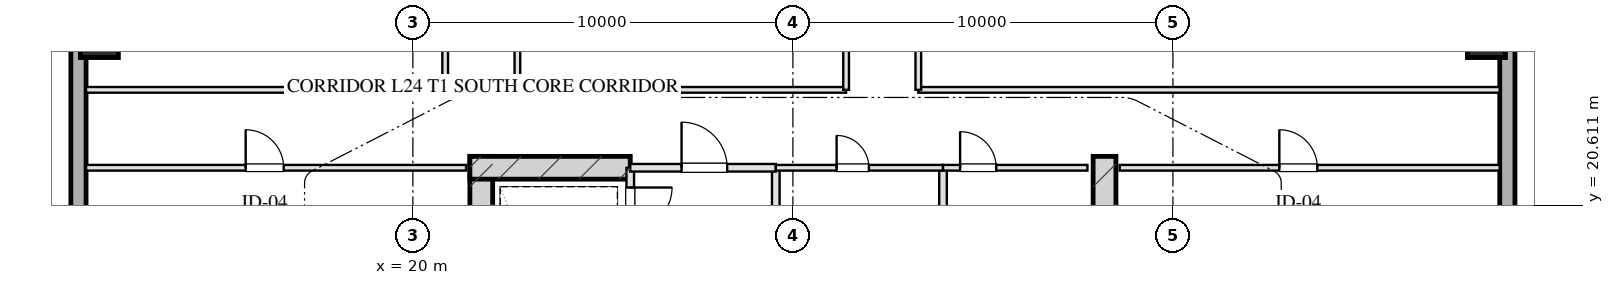
"""IFC4 building model, lengths in metres.
Left out: names, types, materials, properties, quantities, classifications, styles, units other than length and angle.
Written with IfcOpenShell. Run it as: python <this file> out.ifc"""

import sys

from ifc_helpers import new_model, si_unit, direction, frame, frame_2d, origin, origin_2d, place, context, subcontext, project, spatial, rectangle, hollow_rectangle, extrude, element, fill, save


model = new_model("IFC4")
c1 = context("Model", 3, precision=1e-05, world=origin(), true_north=direction((0.0, 1.0)))
c2 = subcontext(c1, "Body", "Model", "MODEL_VIEW")
j1 = project(units=[si_unit("LENGTHUNIT", "METRE"), si_unit("PLANEANGLEUNIT", "RADIAN")], contexts=[c1])
p1 = place(None, origin())
s1 = spatial("IfcSite", under=j1, at=p1, CompositionType="ELEMENT")
p2 = place(p1, origin())
s2 = spatial("IfcBuilding", under=s1, at=p2, CompositionType="ELEMENT")
p3 = place(p2, frame((0.0, 0.0, 96.6)))
s3 = spatial("IfcBuildingStorey", under=s2, at=p3, CompositionType="ELEMENT", Elevation=96.6)
for number, where, z_axis, x_axis in (
    (1, (21.8, 21.9, 0.0), (0.0, 0.0, 1.0), (0.0, -1.0, 0.0)),
    (2, (38.2, 21.9, 0.0), (0.0, 0.0, 1.0), (0.0, -1.0, 0.0)),
):
    element("IfcWall", number, at=place(p3, frame(where, z_axis=z_axis, x_axis=x_axis)), inside=s3, PredefinedType="SHEAR", context=c2, shape_type="SweptSolid", body=[
        extrude(rectangle(XDim=9.48, YDim=0.6, at=frame_2d((4.74, 0.0))), origin(), (0.0, 0.0, 1.0), 3.45),
    ])
p4 = place(p3, frame((21.5, 21.6, 0.0), z_axis=(0.0, 0.0, 1.0), x_axis=(1.0, 0.0, 0.0)))
e3 = element("IfcWall", 3, at=p4, inside=s3, PredefinedType="SHEAR", context=c2, shape_type="SweptSolid", body=[
    extrude(rectangle(XDim=4.22, YDim=0.6, at=frame_2d((2.11, 0.0))), origin(), (0.0, 0.0, 1.0), 3.45),
])
for number, where, z_axis, x_axis in (
    (4, (11.75, 25.0, 0.0), (0.0, 0.0, 1.0), (1.0, 0.0, 0.0)),
    (5, (48.25, 25.0, 0.0), (0.0, 0.0, 1.0), (1.0, 0.0, 0.0)),
):
    element("IfcColumn", number, at=place(p3, frame(where, z_axis=z_axis, x_axis=x_axis)), inside=s3, PredefinedType="COLUMN", context=c2, shape_type="SweptSolid", body=[
        extrude(hollow_rectangle(XDim=1.0, YDim=1.0, WallThickness=0.036, at=origin_2d()), origin(), (0.0, 0.0, 1.0), 3.451),
    ])
p5 = place(p3, frame((11.2, 9.0, 0.0), z_axis=(0.0, 0.0, 1.0), x_axis=(0.0, 1.0, 0.0)))
e6 = element("IfcWall", 6, at=p5, inside=s3, PredefinedType="SOLIDWALL", context=c2, shape_type="SweptSolid", body=[
    extrude(rectangle(XDim=50.0, YDim=0.4, at=frame_2d((25.0, 0.0))), origin(), (0.0, 0.0, 1.0), 2.55),
])
p6 = place(p5, frame((21.2, 0.0, 0.75)))
e7 = element("IfcOpeningElement", 7, at=p6, cuts=e6, PredefinedType="OPENING", context=c2, shape_type="SweptSolid", body=[
    extrude(rectangle(XDim=2.4, YDim=1.4, at=frame_2d((1.2, 0.7))), frame((0.0, 0.21, 0.0), z_axis=(0.0, -1.0, 0.0), x_axis=(1.0, 0.0, 0.0)), (0.0, 0.0, 1.0), 0.42),
])
p7 = place(p5, frame((26.4, 0.0, 0.75)))
e8 = element("IfcOpeningElement", 8, at=p7, cuts=e6, PredefinedType="OPENING", context=c2, shape_type="SweptSolid", body=[
    extrude(rectangle(XDim=2.4, YDim=1.4, at=frame_2d((1.2, 0.7))), frame((0.0, 0.21, 0.0), z_axis=(0.0, -1.0, 0.0), x_axis=(1.0, 0.0, 0.0)), (0.0, 0.0, 1.0), 0.42),
])
p8 = place(p3, frame((48.8, 59.0, 0.0), z_axis=(0.0, 0.0, 1.0), x_axis=(0.0, -1.0, 0.0)))
e9 = element("IfcWall", 9, at=p8, inside=s3, PredefinedType="SOLIDWALL", context=c2, shape_type="SweptSolid", body=[
    extrude(rectangle(XDim=50.0, YDim=0.4, at=frame_2d((25.0, 0.0))), origin(), (0.0, 0.0, 1.0), 2.55),
])
p9 = place(p3, frame((25.72, 21.6, 0.0), z_axis=(0.0, 0.0, 1.0), x_axis=(0.0, -1.0, 0.0)))
e10 = element("IfcWall", 10, at=p9, inside=s3, PredefinedType="PARTITIONING", context=c2, shape_type="SweptSolid", body=[
    extrude(rectangle(XDim=1.9, YDim=0.2, at=frame_2d((0.95, 0.0))), origin(), (0.0, 0.0, 1.0), 3.155),
])
p10 = place(p9, frame((0.52, 0.0, 0.0)))
e11 = element("IfcOpeningElement", 11, at=p10, cuts=e10, PredefinedType="OPENING", context=c2, shape_type="SweptSolid", body=[
    extrude(rectangle(XDim=1.1, YDim=2.05, at=frame_2d((0.55, 1.025))), frame((0.0, 0.11, 0.0), z_axis=(0.0, -1.0, 0.0), x_axis=(1.0, 0.0, 0.0)), (0.0, 0.0, 1.0), 0.22),
])
p11 = place(p3, frame((29.55, 21.6, 0.0), z_axis=(0.0, 0.0, 1.0), x_axis=(0.0, -1.0, 0.0)))
e12 = element("IfcWall", 12, at=p11, inside=s3, PredefinedType="PARTITIONING", context=c2, shape_type="SweptSolid", body=[
    extrude(rectangle(XDim=8.43, YDim=0.2, at=frame_2d((4.215, 0.0))), origin(), (0.0, 0.0, 1.0), 3.155),
])
p12 = place(p3, frame((25.72, 21.6, 0.0), z_axis=(0.0, 0.0, 1.0), x_axis=(1.0, 0.0, 0.0)))
e13 = element("IfcWall", 13, at=p12, inside=s3, PredefinedType="PARTITIONING", context=c2, shape_type="SweptSolid", body=[
    extrude(rectangle(XDim=3.83, YDim=0.2, at=frame_2d((1.915, 0.0))), origin(), (0.0, 0.0, 1.0), 3.155),
])
p13 = place(p12, frame((1.35, 0.0, 0.0)))
e14 = element("IfcOpeningElement", 14, at=p13, cuts=e13, PredefinedType="OPENING", context=c2, shape_type="SweptSolid", body=[
    extrude(rectangle(XDim=1.2, YDim=2.05, at=frame_2d((0.6, 1.025))), frame((0.0, 0.11, 0.0), z_axis=(0.0, -1.0, 0.0), x_axis=(1.0, 0.0, 0.0)), (0.0, 0.0, 1.0), 0.22),
])
p14 = place(p3, frame((33.95, 21.6, 0.0), z_axis=(0.0, 0.0, 1.0), x_axis=(0.0, -1.0, 0.0)))
e15 = element("IfcWall", 15, at=p14, inside=s3, PredefinedType="PARTITIONING", context=c2, shape_type="SweptSolid", body=[
    extrude(rectangle(XDim=8.43, YDim=0.2, at=frame_2d((4.215, 0.0))), origin(), (0.0, 0.0, 1.0), 3.155),
])
p15 = place(p3, frame((29.55, 21.6, 0.0), z_axis=(0.0, 0.0, 1.0), x_axis=(1.0, 0.0, 0.0)))
e16 = element("IfcWall", 16, at=p15, inside=s3, PredefinedType="PARTITIONING", context=c2, shape_type="SweptSolid", body=[
    extrude(rectangle(XDim=4.4, YDim=0.15, at=frame_2d((2.2, 0.0))), origin(), (0.0, 0.0, 1.0), 3.155),
])
p16 = place(p15, frame((1.6, 0.0, 0.0)))
e17 = element("IfcOpeningElement", 17, at=p16, cuts=e16, PredefinedType="OPENING", context=c2, shape_type="SweptSolid", body=[
    extrude(rectangle(XDim=0.85, YDim=2.05, at=frame_2d((0.425, 1.025))), frame((0.0, 0.085, 0.0), z_axis=(0.0, -1.0, 0.0), x_axis=(1.0, 0.0, 0.0)), (0.0, 0.0, 1.0), 0.17),
])
p17 = place(p3, frame((33.95, 21.6, 0.0), z_axis=(0.0, 0.0, 1.0), x_axis=(1.0, 0.0, 0.0)))
e18 = element("IfcWall", 18, at=p17, inside=s3, PredefinedType="PARTITIONING", context=c2, shape_type="SweptSolid", body=[
    extrude(rectangle(XDim=3.8, YDim=0.15, at=frame_2d((1.9, 0.0))), origin(), (0.0, 0.0, 1.0), 3.155),
])
p18 = place(p17, frame((0.45, 0.0, 0.0)))
e19 = element("IfcOpeningElement", 19, at=p18, cuts=e18, PredefinedType="OPENING", context=c2, shape_type="SweptSolid", body=[
    extrude(rectangle(XDim=0.95, YDim=2.05, at=frame_2d((0.475, 1.025))), frame((0.0, 0.085, 0.0), z_axis=(0.0, -1.0, 0.0), x_axis=(1.0, 0.0, 0.0)), (0.0, 0.0, 1.0), 0.17),
])
p19 = place(p3, frame((11.4, 21.6, 0.0), z_axis=(0.0, 0.0, 1.0), x_axis=(1.0, 0.0, 0.0)))
e20 = element("IfcWall", 20, at=p19, inside=s3, PredefinedType="PARTITIONING", context=c2, shape_type="SweptSolid", body=[
    extrude(rectangle(XDim=10.0, YDim=0.15, at=frame_2d((5.0, 0.0))), origin(), (0.0, 0.0, 1.0), 3.155),
])
p20 = place(p19, frame((4.2, 0.0, 0.0)))
e21 = element("IfcOpeningElement", 21, at=p20, cuts=e20, PredefinedType="OPENING", context=c2, shape_type="SweptSolid", body=[
    extrude(rectangle(XDim=1.0, YDim=2.05, at=frame_2d((0.5, 1.025))), frame((0.0, 0.085, 0.0), z_axis=(0.0, -1.0, 0.0), x_axis=(1.0, 0.0, 0.0)), (0.0, 0.0, 1.0), 0.17),
])
p21 = place(p3, frame((38.6, 21.6, 0.0), z_axis=(0.0, 0.0, 1.0), x_axis=(1.0, 0.0, 0.0)))
e22 = element("IfcWall", 22, at=p21, inside=s3, PredefinedType="PARTITIONING", context=c2, shape_type="SweptSolid", body=[
    extrude(rectangle(XDim=10.0, YDim=0.15, at=frame_2d((5.0, 0.0))), origin(), (0.0, 0.0, 1.0), 3.155),
])
p22 = place(p21, frame((4.2, 0.0, 0.0)))
e23 = element("IfcOpeningElement", 23, at=p22, cuts=e22, PredefinedType="OPENING", context=c2, shape_type="SweptSolid", body=[
    extrude(rectangle(XDim=1.0, YDim=2.05, at=frame_2d((0.5, 1.025))), frame((0.0, 0.085, 0.0), z_axis=(0.0, -1.0, 0.0), x_axis=(1.0, 0.0, 0.0)), (0.0, 0.0, 1.0), 0.17),
])
p23 = place(p3, frame((11.4, 23.65, 0.0), z_axis=(0.0, 0.0, 1.0), x_axis=(1.0, 0.0, 0.0)))
e24 = element("IfcWall", 24, at=p23, inside=s3, PredefinedType="PARTITIONING", context=c2, shape_type="SweptSolid", body=[
    extrude(rectangle(XDim=9.45, YDim=0.15, at=frame_2d((4.725, 0.0))), origin(), (0.0, 0.0, 1.0), 3.155),
])
p24 = place(p3, frame((22.75, 23.65, 0.0), z_axis=(0.0, 0.0, 1.0), x_axis=(1.0, 0.0, 0.0)))
e25 = element("IfcWall", 25, at=p24, inside=s3, PredefinedType="PARTITIONING", context=c2, shape_type="SweptSolid", body=[
    extrude(rectangle(XDim=8.65, YDim=0.15, at=frame_2d((4.325, 0.0))), origin(), (0.0, 0.0, 1.0), 3.155),
])
p25 = place(p3, frame((33.3, 23.65, 0.0), z_axis=(0.0, 0.0, 1.0), x_axis=(1.0, 0.0, 0.0)))
e26 = element("IfcWall", 26, at=p25, inside=s3, PredefinedType="PARTITIONING", context=c2, shape_type="SweptSolid", body=[
    extrude(rectangle(XDim=15.3, YDim=0.15, at=frame_2d((7.65, 0.0))), origin(), (0.0, 0.0, 1.0), 3.155),
])
p26 = place(p3, frame((20.85, 23.65, 0.0), z_axis=(0.0, 0.0, 1.0), x_axis=(0.0, 1.0, 0.0)))
e27 = element("IfcWall", 27, at=p26, inside=s3, PredefinedType="PARTITIONING", context=c2, shape_type="SweptSolid", body=[
    extrude(rectangle(XDim=20.7, YDim=0.15, at=frame_2d((10.35, 0.0))), origin(), (0.0, 0.0, 1.0), 3.155),
])
p27 = place(p26, frame((2.175, 0.0, 0.0)))
e28 = element("IfcOpeningElement", 28, at=p27, cuts=e27, PredefinedType="OPENING", context=c2, shape_type="SweptSolid", body=[
    extrude(rectangle(XDim=1.0, YDim=2.05, at=frame_2d((0.5, 1.025))), frame((0.0, 0.085, 0.0), z_axis=(0.0, -1.0, 0.0), x_axis=(1.0, 0.0, 0.0)), (0.0, 0.0, 1.0), 0.17),
])
p28 = place(p26, frame((7.69, 0.0, 0.0)))
e29 = element("IfcOpeningElement", 29, at=p28, cuts=e27, PredefinedType="OPENING", context=c2, shape_type="SweptSolid", body=[
    extrude(rectangle(XDim=1.0, YDim=2.05, at=frame_2d((0.5, 1.025))), frame((0.0, 0.085, 0.0), z_axis=(0.0, -1.0, 0.0), x_axis=(1.0, 0.0, 0.0)), (0.0, 0.0, 1.0), 0.17),
])
p29 = place(p26, frame((12.69, 0.0, 0.0)))
e30 = element("IfcOpeningElement", 30, at=p29, cuts=e27, PredefinedType="OPENING", context=c2, shape_type="SweptSolid", body=[
    extrude(rectangle(XDim=1.0, YDim=2.05, at=frame_2d((0.5, 1.025))), frame((0.0, 0.085, 0.0), z_axis=(0.0, -1.0, 0.0), x_axis=(1.0, 0.0, 0.0)), (0.0, 0.0, 1.0), 0.17),
])
p30 = place(p26, frame((17.525, 0.0, 0.0)))
e31 = element("IfcOpeningElement", 31, at=p30, cuts=e27, PredefinedType="OPENING", context=c2, shape_type="SweptSolid", body=[
    extrude(rectangle(XDim=1.0, YDim=2.05, at=frame_2d((0.5, 1.025))), frame((0.0, 0.085, 0.0), z_axis=(0.0, -1.0, 0.0), x_axis=(1.0, 0.0, 0.0)), (0.0, 0.0, 1.0), 0.17),
])
p31 = place(p3, frame((22.75, 23.65, 0.0), z_axis=(0.0, 0.0, 1.0), x_axis=(0.0, 1.0, 0.0)))
e32 = element("IfcWall", 32, at=p31, inside=s3, PredefinedType="PARTITIONING", context=c2, shape_type="SweptSolid", body=[
    extrude(rectangle(XDim=20.7, YDim=0.15, at=frame_2d((10.35, 0.0))), origin(), (0.0, 0.0, 1.0), 3.155),
])
p32 = place(p31, frame((9.936, 0.0, 0.0)))
e33 = element("IfcOpeningElement", 33, at=p32, cuts=e32, PredefinedType="OPENING", context=c2, shape_type="SweptSolid", body=[
    extrude(rectangle(XDim=1.1, YDim=2.05, at=frame_2d((0.55, 1.025))), frame((0.0, 0.085, 0.0), z_axis=(0.0, -1.0, 0.0), x_axis=(1.0, 0.0, 0.0)), (0.0, 0.0, 1.0), 0.17),
])
p33 = place(p3, frame((31.4, 23.65, 0.0), z_axis=(0.0, 0.0, 1.0), x_axis=(0.0, 1.0, 0.0)))
e34 = element("IfcWall", 34, at=p33, inside=s3, PredefinedType="PARTITIONING", context=c2, shape_type="SweptSolid", body=[
    extrude(rectangle(XDim=20.7, YDim=0.15, at=frame_2d((10.35, 0.0))), origin(), (0.0, 0.0, 1.0), 3.155),
])
p34 = place(p3, frame((33.3, 23.65, 0.0), z_axis=(0.0, 0.0, 1.0), x_axis=(0.0, 1.0, 0.0)))
e35 = element("IfcWall", 35, at=p34, inside=s3, PredefinedType="PARTITIONING", context=c2, shape_type="SweptSolid", body=[
    extrude(rectangle(XDim=20.7, YDim=0.15, at=frame_2d((10.35, 0.0))), origin(), (0.0, 0.0, 1.0), 3.155),
])
p35 = place(p34, frame((2.175, 0.0, 0.0)))
e36 = element("IfcOpeningElement", 36, at=p35, cuts=e35, PredefinedType="OPENING", context=c2, shape_type="SweptSolid", body=[
    extrude(rectangle(XDim=1.05, YDim=2.05, at=frame_2d((0.525, 1.025))), frame((0.0, 0.085, 0.0), z_axis=(0.0, -1.0, 0.0), x_axis=(1.0, 0.0, 0.0)), (0.0, 0.0, 1.0), 0.17),
])
p36 = place(p34, frame((6.75, 0.0, 0.0)))
e37 = element("IfcOpeningElement", 37, at=p36, cuts=e35, PredefinedType="OPENING", context=c2, shape_type="SweptSolid", body=[
    extrude(rectangle(XDim=1.0, YDim=2.05, at=frame_2d((0.5, 1.025))), frame((0.0, 0.085, 0.0), z_axis=(0.0, -1.0, 0.0), x_axis=(1.0, 0.0, 0.0)), (0.0, 0.0, 1.0), 0.17),
])
p37 = place(p34, frame((11.25, 0.0, 0.0)))
e38 = element("IfcOpeningElement", 38, at=p37, cuts=e35, PredefinedType="OPENING", context=c2, shape_type="SweptSolid", body=[
    extrude(rectangle(XDim=1.0, YDim=2.05, at=frame_2d((0.5, 1.025))), frame((0.0, 0.085, 0.0), z_axis=(0.0, -1.0, 0.0), x_axis=(1.0, 0.0, 0.0)), (0.0, 0.0, 1.0), 0.17),
])
p38 = place(p34, frame((15.75, 0.0, 0.0)))
e39 = element("IfcOpeningElement", 39, at=p38, cuts=e35, PredefinedType="OPENING", context=c2, shape_type="SweptSolid", body=[
    extrude(rectangle(XDim=1.0, YDim=2.05, at=frame_2d((0.5, 1.025))), frame((0.0, 0.085, 0.0), z_axis=(0.0, -1.0, 0.0), x_axis=(1.0, 0.0, 0.0)), (0.0, 0.0, 1.0), 0.17),
])
p39 = place(p34, frame((18.925, 0.0, 0.0)))
e40 = element("IfcOpeningElement", 40, at=p39, cuts=e35, PredefinedType="OPENING", context=c2, shape_type="SweptSolid", body=[
    extrude(rectangle(XDim=0.85, YDim=2.05, at=frame_2d((0.425, 1.025))), frame((0.0, 0.085, 0.0), z_axis=(0.0, -1.0, 0.0), x_axis=(1.0, 0.0, 0.0)), (0.0, 0.0, 1.0), 0.17),
])
p40 = place(p10, origin())
e41 = element("IfcDoor", 41, at=p40, inside=s3, OperationType="SINGLE_SWING_LEFT", PredefinedType="DOOR", context=c2, shape_type="SweptSolid", body=[
    extrude(rectangle(XDim=1.1, YDim=2.05, at=frame_2d((0.55, 1.025))), frame((0.0, 0.025, 0.0), z_axis=(0.0, -1.0, 0.0), x_axis=(1.0, 0.0, 0.0)), (0.0, 0.0, 1.0), 0.05),
])
fill(e11, e41)
p41 = place(p13, origin())
e42 = element("IfcDoor", 42, at=p41, inside=s3, OperationType="SINGLE_SWING_LEFT", PredefinedType="DOOR", context=c2, shape_type="SweptSolid", body=[
    extrude(rectangle(XDim=1.2, YDim=2.05, at=frame_2d((0.6, 1.025))), frame((0.0, 0.025, 0.0), z_axis=(0.0, -1.0, 0.0), x_axis=(1.0, 0.0, 0.0)), (0.0, 0.0, 1.0), 0.05),
])
fill(e14, e42)
p42 = place(p16, origin())
e43 = element("IfcDoor", 43, at=p42, inside=s3, OperationType="SINGLE_SWING_LEFT", PredefinedType="DOOR", context=c2, shape_type="SweptSolid", body=[
    extrude(rectangle(XDim=0.85, YDim=2.05, at=frame_2d((0.425, 1.025))), frame((0.0, 0.025, 0.0), z_axis=(0.0, -1.0, 0.0), x_axis=(1.0, 0.0, 0.0)), (0.0, 0.0, 1.0), 0.05),
])
fill(e17, e43)
p43 = place(p18, origin())
e44 = element("IfcDoor", 44, at=p43, inside=s3, OperationType="SINGLE_SWING_LEFT", PredefinedType="DOOR", context=c2, shape_type="SweptSolid", body=[
    extrude(rectangle(XDim=0.95, YDim=2.05, at=frame_2d((0.475, 1.025))), frame((0.0, 0.025, 0.0), z_axis=(0.0, -1.0, 0.0), x_axis=(1.0, 0.0, 0.0)), (0.0, 0.0, 1.0), 0.05),
])
fill(e19, e44)
p44 = place(p20, origin())
e45 = element("IfcDoor", 45, at=p44, inside=s3, OperationType="SINGLE_SWING_LEFT", PredefinedType="DOOR", context=c2, shape_type="SweptSolid", body=[
    extrude(rectangle(XDim=1.0, YDim=2.05, at=frame_2d((0.5, 1.025))), frame((0.0, 0.025, 0.0), z_axis=(0.0, -1.0, 0.0), x_axis=(1.0, 0.0, 0.0)), (0.0, 0.0, 1.0), 0.05),
])
fill(e21, e45)
p45 = place(p22, origin())
e46 = element("IfcDoor", 46, at=p45, inside=s3, OperationType="SINGLE_SWING_LEFT", PredefinedType="DOOR", context=c2, shape_type="SweptSolid", body=[
    extrude(rectangle(XDim=1.0, YDim=2.05, at=frame_2d((0.5, 1.025))), frame((0.0, 0.025, 0.0), z_axis=(0.0, -1.0, 0.0), x_axis=(1.0, 0.0, 0.0)), (0.0, 0.0, 1.0), 0.05),
])
fill(e23, e46)
save(model, sys.argv[1])
